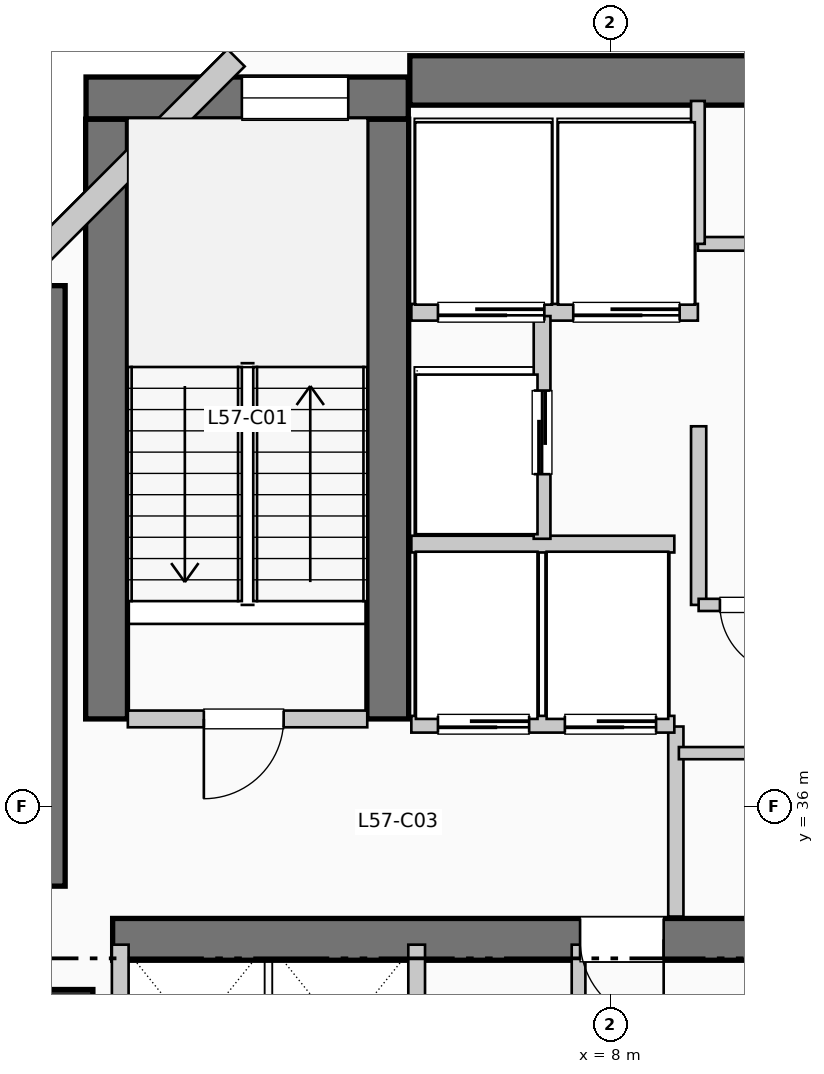
"""IFC4 building model, lengths in metres.
Left out: names, types, materials, properties, quantities, classifications, styles, units other than length and angle.
Written with IfcOpenShell. Run it as: python <this file> out.ifc"""

import sys

from ifc_helpers import new_model, si_unit, direction, frame, frame_2d, origin, origin_2d, place, context, subcontext, project, spatial, rectangle, extrude, element, fill, save


model = new_model("IFC4")
c1 = context("Model", 3, precision=1e-05, world=origin(), true_north=direction((0.0, 1.0)))
c2 = subcontext(c1, "Body", "Model", "MODEL_VIEW")
j1 = project(units=[si_unit("LENGTHUNIT", "METRE"), si_unit("PLANEANGLEUNIT", "RADIAN")], contexts=[c1])
p1 = place(None, origin())
s1 = spatial("IfcSite", under=j1, at=p1, CompositionType="ELEMENT")
p2 = place(p1, origin())
s2 = spatial("IfcBuilding", under=s1, at=p2, CompositionType="ELEMENT")
p3 = place(p2, frame((0.0, 0.0, 235.62)))
s3 = spatial("IfcBuildingStorey", under=s2, at=p3, CompositionType="ELEMENT", Elevation=235.62)
p4 = place(p3, frame((5.36, 45.55, 0.0), z_axis=(0.0, 0.0, 1.0), x_axis=(1.0, 0.0, 0.0)))
e1 = element("IfcWall", 1, at=p4, inside=s3, PredefinedType="SHEAR", context=c2, shape_type="SweptSolid", body=[
    extrude(rectangle(XDim=13.98, YDim=0.65, at=frame_2d((6.99, 0.0))), origin(), (0.0, 0.0, 1.0), 3.96),
])
p5 = place(p3, frame((0.5, 34.95, 0.0), z_axis=(0.0, 0.0, 1.0), x_axis=(0.0, 1.0, 0.0)))
e2 = element("IfcWall", 2, at=p5, inside=s3, PredefinedType="SHEAR", context=c2, shape_type="SweptSolid", body=[
    extrude(rectangle(XDim=7.9, YDim=0.65, at=frame_2d((3.95, 0.0))), origin(), (0.0, 0.0, 1.0), 3.96),
])
p6 = place(p3, frame((1.45, 34.25, 0.0), z_axis=(0.0, 0.0, 1.0), x_axis=(1.0, 0.0, 0.0)))
e3 = element("IfcWall", 3, at=p6, inside=s3, PredefinedType="SHEAR", context=c2, shape_type="SweptSolid", body=[
    extrude(rectangle(XDim=10.71, YDim=0.55, at=frame_2d((5.355, 0.0))), origin(), (0.0, 0.0, 1.0), 3.96),
])
p7 = place(p6, frame((7.25, 0.0, 0.0), z_axis=(0.0, 0.0, 1.0), x_axis=(-1.0, 0.0, 0.0)))
e4 = element("IfcOpeningElement", 4, at=p7, cuts=e3, PredefinedType="OPENING", context=c2, shape_type="SweptSolid", body=[
    extrude(rectangle(XDim=1.1, YDim=2.15, at=frame_2d((0.55, 1.075))), frame((0.0, 0.285, 0.0), z_axis=(0.0, -1.0, 0.0), x_axis=(1.0, 0.0, 0.0)), (0.0, 0.0, 1.0), 0.57),
])
for number, where, z_axis, x_axis in (
    (5, (1.37, 37.15, 0.0), (0.0, 0.0, 1.0), (0.0, 1.0, 0.0)),
    (6, (5.07, 37.15, 0.0), (0.0, 0.0, 1.0), (0.0, 1.0, 0.0)),
):
    element("IfcWall", number, at=place(p3, frame(where, z_axis=z_axis, x_axis=x_axis)), inside=s3, PredefinedType="SHEAR", context=c2, shape_type="SweptSolid", body=[
        extrude(rectangle(XDim=7.89, YDim=0.55, at=frame_2d((3.945, 0.0))), origin(), (0.0, 0.0, 1.0), 3.96),
    ])
p8 = place(p3, frame((1.1, 45.32, 0.0), z_axis=(0.0, 0.0, 1.0), x_axis=(1.0, 0.0, 0.0)))
e7 = element("IfcWall", 7, at=p8, inside=s3, PredefinedType="SHEAR", context=c2, shape_type="SweptSolid", body=[
    extrude(rectangle(XDim=4.24, YDim=0.55, at=frame_2d((2.12, 0.0))), origin(), (0.0, 0.0, 1.0), 3.96),
])
p9 = place(p8, frame((2.05, 0.0, 1.05)))
e8 = element("IfcOpeningElement", 8, at=p9, cuts=e7, PredefinedType="OPENING", context=c2, shape_type="SweptSolid", body=[
    extrude(rectangle(XDim=1.4, YDim=1.8, at=frame_2d((0.7, 0.9))), frame((0.0, 0.285, 0.0), z_axis=(0.0, -1.0, 0.0), x_axis=(1.0, 0.0, 0.0)), (0.0, 0.0, 1.0), 0.57),
])
p10 = place(p3, frame((0.8, 33.2, 0.0), z_axis=(0.0, 0.0, 1.0), x_axis=(1.0, 0.0, 0.0)))
e9 = element("IfcColumn", 9, at=p10, inside=s3, PredefinedType="COLUMN", context=c2, shape_type="SweptSolid", body=[
    extrude(rectangle(XDim=0.78, YDim=0.78, at=origin_2d()), origin(), (0.0, 0.0, 1.0), 3.96),
])
p11 = place(p3, frame((3.074, 45.848, 0.0), z_axis=(0.0, 0.0, 1.0), x_axis=(-0.707106781187, -0.707106781187, 0.0)))
e10 = element("IfcWall", 10, at=p11, inside=s3, PredefinedType="SOLIDWALL", context=c2, shape_type="SweptSolid", body=[
    extrude(rectangle(XDim=4.133, YDim=0.32, at=frame_2d((2.066, 0.0))), origin(), (0.0, 0.0, 1.0), 3.71),
])
p12 = place(p3, frame((1.65, 37.15, 0.0), z_axis=(0.0, 0.0, 1.0), x_axis=(1.0, 0.0, 0.0)))
e11 = element("IfcWall", 11, at=p12, inside=s3, PredefinedType="PARTITIONING", context=c2, shape_type="SweptSolid", body=[
    extrude(rectangle(XDim=3.15, YDim=0.22, at=frame_2d((1.575, 0.0))), origin(), (0.0, 0.0, 1.0), 3.71),
])
p13 = place(p12, frame((2.05, 0.0, 0.0), z_axis=(0.0, 0.0, 1.0), x_axis=(-1.0, 0.0, 0.0)))
e12 = element("IfcOpeningElement", 12, at=p13, cuts=e11, PredefinedType="OPENING", context=c2, shape_type="SweptSolid", body=[
    extrude(rectangle(XDim=1.05, YDim=2.15, at=frame_2d((0.525, 1.075))), frame((0.0, 0.12, 0.0), z_axis=(0.0, -1.0, 0.0), x_axis=(1.0, 0.0, 0.0)), (0.0, 0.0, 1.0), 0.24),
])
p14 = place(p3, frame((8.86, 34.55, 0.0), z_axis=(0.0, 0.0, 1.0), x_axis=(0.0, 1.0, 0.0)))
e13 = element("IfcWall", 13, at=p14, inside=s3, PredefinedType="PARTITIONING", context=c2, shape_type="SweptSolid", body=[
    extrude(rectangle(XDim=2.5, YDim=0.2, at=frame_2d((1.25, 0.0))), origin(), (0.0, 0.0, 1.0), 3.71),
])
p15 = place(p3, frame((5.38, 37.08, 0.0), z_axis=(0.0, 0.0, 1.0), x_axis=(1.0, 0.0, 0.0)))
e14 = element("IfcWall", 14, at=p15, inside=s3, PredefinedType="PARTITIONING", context=c2, shape_type="SweptSolid", body=[
    extrude(rectangle(XDim=3.46, YDim=0.22, at=frame_2d((1.73, 0.0))), origin(), (0.0, 0.0, 1.0), 3.71),
])
p16 = place(p15, frame((1.55, 0.0, 0.0), z_axis=(0.0, 0.0, 1.0), x_axis=(-1.0, 0.0, 0.0)))
e15 = element("IfcOpeningElement", 15, at=p16, cuts=e14, PredefinedType="OPENING", context=c2, shape_type="SweptSolid", body=[
    extrude(rectangle(XDim=1.2, YDim=2.2, at=frame_2d((0.6, 1.1))), frame((0.0, 0.12, 0.0), z_axis=(0.0, -1.0, 0.0), x_axis=(1.0, 0.0, 0.0)), (0.0, 0.0, 1.0), 0.24),
])
p17 = place(p15, frame((3.22, 0.0, 0.0), z_axis=(0.0, 0.0, 1.0), x_axis=(-1.0, 0.0, 0.0)))
e16 = element("IfcOpeningElement", 16, at=p17, cuts=e14, PredefinedType="OPENING", context=c2, shape_type="SweptSolid", body=[
    extrude(rectangle(XDim=1.2, YDim=2.2, at=frame_2d((0.6, 1.1))), frame((0.0, 0.12, 0.0), z_axis=(0.0, -1.0, 0.0), x_axis=(1.0, 0.0, 0.0)), (0.0, 0.0, 1.0), 0.24),
])
p18 = place(p3, frame((5.38, 39.45, 0.0), z_axis=(0.0, 0.0, 1.0), x_axis=(1.0, 0.0, 0.0)))
e17 = element("IfcWall", 17, at=p18, inside=s3, PredefinedType="PARTITIONING", context=c2, shape_type="SweptSolid", body=[
    extrude(rectangle(XDim=3.46, YDim=0.22, at=frame_2d((1.73, 0.0))), origin(), (0.0, 0.0, 1.0), 3.71),
])
p19 = place(p3, frame((5.38, 42.5, 0.0), z_axis=(0.0, 0.0, 1.0), x_axis=(1.0, 0.0, 0.0)))
e18 = element("IfcWall", 18, at=p19, inside=s3, PredefinedType="PARTITIONING", context=c2, shape_type="SweptSolid", body=[
    extrude(rectangle(XDim=3.77, YDim=0.22, at=frame_2d((1.885, 0.0))), origin(), (0.0, 0.0, 1.0), 3.71),
])
p20 = place(p19, frame((1.75, 0.0, 0.0), z_axis=(0.0, 0.0, 1.0), x_axis=(-1.0, 0.0, 0.0)))
e19 = element("IfcOpeningElement", 19, at=p20, cuts=e18, PredefinedType="OPENING", context=c2, shape_type="SweptSolid", body=[
    extrude(rectangle(XDim=1.4, YDim=2.2, at=frame_2d((0.7, 1.1))), frame((0.0, 0.12, 0.0), z_axis=(0.0, -1.0, 0.0), x_axis=(1.0, 0.0, 0.0)), (0.0, 0.0, 1.0), 0.24),
])
p21 = place(p19, frame((3.53, 0.0, 0.0), z_axis=(0.0, 0.0, 1.0), x_axis=(-1.0, 0.0, 0.0)))
e20 = element("IfcOpeningElement", 20, at=p21, cuts=e18, PredefinedType="OPENING", context=c2, shape_type="SweptSolid", body=[
    extrude(rectangle(XDim=1.4, YDim=2.2, at=frame_2d((0.7, 1.1))), frame((0.0, 0.12, 0.0), z_axis=(0.0, -1.0, 0.0), x_axis=(1.0, 0.0, 0.0)), (0.0, 0.0, 1.0), 0.24),
])
p22 = place(p3, frame((7.1, 39.52, 0.0), z_axis=(0.0, 0.0, 1.0), x_axis=(0.0, 1.0, 0.0)))
e21 = element("IfcWall", 21, at=p22, inside=s3, PredefinedType="PARTITIONING", context=c2, shape_type="SweptSolid", body=[
    extrude(rectangle(XDim=2.93, YDim=0.22, at=frame_2d((1.465, 0.0))), origin(), (0.0, 0.0, 1.0), 3.71),
])
p23 = place(p22, frame((0.85, 0.0, 0.0)))
e22 = element("IfcOpeningElement", 22, at=p23, cuts=e21, PredefinedType="OPENING", context=c2, shape_type="SweptSolid", body=[
    extrude(rectangle(XDim=1.1, YDim=2.2, at=frame_2d((0.55, 1.1))), frame((0.0, 0.12, 0.0), z_axis=(0.0, -1.0, 0.0), x_axis=(1.0, 0.0, 0.0)), (0.0, 0.0, 1.0), 0.24),
])
for number, where, z_axis, x_axis in (
    (23, (1.55, 31.8, 0.0), (0.0, 0.0, 1.0), (0.0, 1.0, 0.0)),
    (24, (5.45, 31.8, 0.0), (0.0, 0.0, 1.0), (0.0, 1.0, 0.0)),
):
    element("IfcWall", number, at=place(p3, frame(where, z_axis=z_axis, x_axis=x_axis)), inside=s3, PredefinedType="PARTITIONING", context=c2, shape_type="SweptSolid", body=[
        extrude(rectangle(XDim=2.38, YDim=0.22, at=frame_2d((1.19, 0.0))), origin(), (0.0, 0.0, 1.0), 3.71),
    ])
p24 = place(p3, frame((9.16, 38.65, 0.0), z_axis=(0.0, 0.0, 1.0), x_axis=(0.0, 1.0, 0.0)))
e25 = element("IfcWall", 25, at=p24, inside=s3, PredefinedType="PARTITIONING", context=c2, shape_type="SweptSolid", body=[
    extrude(rectangle(XDim=2.35, YDim=0.2, at=frame_2d((1.175, 0.0))), origin(), (0.0, 0.0, 1.0), 3.71),
])
p25 = place(p3, frame((7.58, 31.82, 0.0), z_axis=(0.0, 0.0, 1.0), x_axis=(0.0, 1.0, 0.0)))
e26 = element("IfcWall", 26, at=p25, inside=s3, PredefinedType="PLUMBINGWALL", context=c2, shape_type="SweptSolid", body=[
    extrude(rectangle(XDim=2.36, YDim=0.18, at=frame_2d((1.18, 0.0))), origin(), (0.0, 0.0, 1.0), 3.71),
])
p26 = place(p3, frame((8.9, 36.7, 0.0), z_axis=(0.0, 0.0, 1.0), x_axis=(1.0, 0.0, 0.0)))
e27 = element("IfcWall", 27, at=p26, inside=s3, PredefinedType="PARTITIONING", context=c2, shape_type="SweptSolid", body=[
    extrude(rectangle(XDim=3.25, YDim=0.16, at=frame_2d((1.625, 0.0))), origin(), (0.0, 0.0, 1.0), 3.71),
])
p27 = place(p26, frame((1.1, 0.0, 0.0)))
e28 = element("IfcOpeningElement", 28, at=p27, cuts=e27, PredefinedType="OPENING", context=c2, shape_type="SweptSolid", body=[
    extrude(rectangle(XDim=0.95, YDim=2.15, at=frame_2d((0.475, 1.075))), frame((0.0, 0.09, 0.0), z_axis=(0.0, -1.0, 0.0), x_axis=(1.0, 0.0, 0.0)), (0.0, 0.0, 1.0), 0.18),
])
p28 = place(p3, frame((9.16, 38.65, 0.0), z_axis=(0.0, 0.0, 1.0), x_axis=(1.0, 0.0, 0.0)))
e29 = element("IfcWall", 29, at=p28, inside=s3, PredefinedType="PARTITIONING", context=c2, shape_type="SweptSolid", body=[
    extrude(rectangle(XDim=3.42, YDim=0.16, at=frame_2d((1.71, 0.0))), origin(), (0.0, 0.0, 1.0), 3.71),
])
p29 = place(p28, frame((1.18, 0.0, 0.0), z_axis=(0.0, 0.0, 1.0), x_axis=(-1.0, 0.0, 0.0)))
e30 = element("IfcOpeningElement", 30, at=p29, cuts=e29, PredefinedType="OPENING", context=c2, shape_type="SweptSolid", body=[
    extrude(rectangle(XDim=0.9, YDim=2.15, at=frame_2d((0.45, 1.075))), frame((0.0, 0.09, 0.0), z_axis=(0.0, -1.0, 0.0), x_axis=(1.0, 0.0, 0.0)), (0.0, 0.0, 1.0), 0.18),
])
p30 = place(p28, frame((2.6, 0.0, 0.0), z_axis=(0.0, 0.0, 1.0), x_axis=(-1.0, 0.0, 0.0)))
e31 = element("IfcOpeningElement", 31, at=p30, cuts=e29, PredefinedType="OPENING", context=c2, shape_type="SweptSolid", body=[
    extrude(rectangle(XDim=0.9, YDim=2.15, at=frame_2d((0.45, 1.075))), frame((0.0, 0.09, 0.0), z_axis=(0.0, -1.0, 0.0), x_axis=(1.0, 0.0, 0.0)), (0.0, 0.0, 1.0), 0.18),
])
p31 = place(p3, frame((9.15, 43.4, 0.0), z_axis=(0.0, 0.0, 1.0), x_axis=(1.0, 0.0, 0.0)))
e32 = element("IfcWall", 32, at=p31, inside=s3, PredefinedType="PLUMBINGWALL", context=c2, shape_type="SweptSolid", body=[
    extrude(rectangle(XDim=9.33, YDim=0.18, at=frame_2d((4.665, 0.0))), origin(), (0.0, 0.0, 1.0), 3.71),
])
p32 = place(p31, frame((0.72, 0.0, 0.0)))
e33 = element("IfcOpeningElement", 33, at=p32, cuts=e32, PredefinedType="OPENING", context=c2, shape_type="SweptSolid", body=[
    extrude(rectangle(XDim=0.92, YDim=2.1, at=frame_2d((0.46, 1.05))), frame((0.0, 0.1, 0.0), z_axis=(0.0, -1.0, 0.0), x_axis=(1.0, 0.0, 0.0)), (0.0, 0.0, 1.0), 0.2),
])
p33 = place(p31, frame((3.02, 0.0, 0.0)))
e34 = element("IfcOpeningElement", 34, at=p33, cuts=e32, PredefinedType="OPENING", context=c2, shape_type="SweptSolid", body=[
    extrude(rectangle(XDim=0.92, YDim=2.1, at=frame_2d((0.46, 1.05))), frame((0.0, 0.1, 0.0), z_axis=(0.0, -1.0, 0.0), x_axis=(1.0, 0.0, 0.0)), (0.0, 0.0, 1.0), 0.2),
])
p34 = place(p31, frame((5.34, 0.0, 0.0)))
e35 = element("IfcOpeningElement", 35, at=p34, cuts=e32, PredefinedType="OPENING", context=c2, shape_type="SweptSolid", body=[
    extrude(rectangle(XDim=0.92, YDim=2.1, at=frame_2d((0.46, 1.05))), frame((0.0, 0.1, 0.0), z_axis=(0.0, -1.0, 0.0), x_axis=(1.0, 0.0, 0.0)), (0.0, 0.0, 1.0), 0.2),
])
p35 = place(p31, frame((7.66, 0.0, 0.0)))
e36 = element("IfcOpeningElement", 36, at=p35, cuts=e32, PredefinedType="OPENING", context=c2, shape_type="SweptSolid", body=[
    extrude(rectangle(XDim=0.95, YDim=2.1, at=frame_2d((0.475, 1.05))), frame((0.0, 0.1, 0.0), z_axis=(0.0, -1.0, 0.0), x_axis=(1.0, 0.0, 0.0)), (0.0, 0.0, 1.0), 0.2),
])
p36 = place(p3, frame((9.15, 43.4, 0.0), z_axis=(0.0, 0.0, 1.0), x_axis=(0.0, 1.0, 0.0)))
e37 = element("IfcWall", 37, at=p36, inside=s3, PredefinedType="PLUMBINGWALL", context=c2, shape_type="SweptSolid", body=[
    extrude(rectangle(XDim=1.88, YDim=0.18, at=frame_2d((0.94, 0.0))), origin(), (0.0, 0.0, 1.0), 3.71),
])
p37 = place(p9, origin())
e38 = element("IfcWindow", 38, at=p37, inside=s3, PartitioningType="SINGLE_PANEL", PredefinedType="WINDOW", context=c2, shape_type="SweptSolid", body=[
    extrude(rectangle(XDim=1.4, YDim=1.8, at=frame_2d((0.7, 0.9))), frame((0.0, 0.03, 0.0), z_axis=(0.0, -1.0, 0.0), x_axis=(1.0, 0.0, 0.0)), (0.0, 0.0, 1.0), 0.06),
])
fill(e8, e38)
p38 = place(p13, origin())
e39 = element("IfcDoor", 39, at=p38, inside=s3, OperationType="SINGLE_SWING_LEFT", PredefinedType="DOOR", context=c2, shape_type="SweptSolid", body=[
    extrude(rectangle(XDim=1.05, YDim=2.15, at=frame_2d((0.525, 1.075))), frame((0.0, 0.025, 0.0), z_axis=(0.0, -1.0, 0.0), x_axis=(1.0, 0.0, 0.0)), (0.0, 0.0, 1.0), 0.05),
])
fill(e12, e39)
p39 = place(p7, origin())
e40 = element("IfcDoor", 40, at=p39, inside=s3, OperationType="SINGLE_SWING_RIGHT", PredefinedType="DOOR", context=c2, shape_type="SweptSolid", body=[
    extrude(rectangle(XDim=1.1, YDim=2.15, at=frame_2d((0.55, 1.075))), frame((0.0, 0.025, 0.0), z_axis=(0.0, -1.0, 0.0), x_axis=(1.0, 0.0, 0.0)), (0.0, 0.0, 1.0), 0.05),
])
fill(e4, e40)
p40 = place(p16, origin())
e41 = element("IfcDoor", 41, at=p40, inside=s3, OperationType="SLIDING_TO_RIGHT", PredefinedType="DOOR", context=c2, shape_type="SweptSolid", body=[
    extrude(rectangle(XDim=1.2, YDim=2.2, at=frame_2d((0.6, 1.1))), frame((0.0, 0.025, 0.0), z_axis=(0.0, -1.0, 0.0), x_axis=(1.0, 0.0, 0.0)), (0.0, 0.0, 1.0), 0.05),
])
fill(e15, e41)
p41 = place(p17, origin())
e42 = element("IfcDoor", 42, at=p41, inside=s3, OperationType="SLIDING_TO_RIGHT", PredefinedType="DOOR", context=c2, shape_type="SweptSolid", body=[
    extrude(rectangle(XDim=1.2, YDim=2.2, at=frame_2d((0.6, 1.1))), frame((0.0, 0.025, 0.0), z_axis=(0.0, -1.0, 0.0), x_axis=(1.0, 0.0, 0.0)), (0.0, 0.0, 1.0), 0.05),
])
fill(e16, e42)
p42 = place(p20, origin())
e43 = element("IfcDoor", 43, at=p42, inside=s3, OperationType="SLIDING_TO_LEFT", PredefinedType="DOOR", context=c2, shape_type="SweptSolid", body=[
    extrude(rectangle(XDim=1.4, YDim=2.2, at=frame_2d((0.7, 1.1))), frame((0.0, 0.025, 0.0), z_axis=(0.0, -1.0, 0.0), x_axis=(1.0, 0.0, 0.0)), (0.0, 0.0, 1.0), 0.05),
])
fill(e19, e43)
p43 = place(p21, origin())
e44 = element("IfcDoor", 44, at=p43, inside=s3, OperationType="SLIDING_TO_LEFT", PredefinedType="DOOR", context=c2, shape_type="SweptSolid", body=[
    extrude(rectangle(XDim=1.4, YDim=2.2, at=frame_2d((0.7, 1.1))), frame((0.0, 0.025, 0.0), z_axis=(0.0, -1.0, 0.0), x_axis=(1.0, 0.0, 0.0)), (0.0, 0.0, 1.0), 0.05),
])
fill(e20, e44)
p44 = place(p23, origin())
e45 = element("IfcDoor", 45, at=p44, inside=s3, OperationType="SLIDING_TO_LEFT", PredefinedType="DOOR", context=c2, shape_type="SweptSolid", body=[
    extrude(rectangle(XDim=1.1, YDim=2.2, at=frame_2d((0.55, 1.1))), frame((0.0, 0.025, 0.0), z_axis=(0.0, -1.0, 0.0), x_axis=(1.0, 0.0, 0.0)), (0.0, 0.0, 1.0), 0.05),
])
fill(e22, e45)
p45 = place(p29, origin())
e46 = element("IfcDoor", 46, at=p45, inside=s3, OperationType="SINGLE_SWING_RIGHT", PredefinedType="DOOR", context=c2, shape_type="SweptSolid", body=[
    extrude(rectangle(XDim=0.9, YDim=2.15, at=frame_2d((0.45, 1.075))), frame((0.0, 0.025, 0.0), z_axis=(0.0, -1.0, 0.0), x_axis=(1.0, 0.0, 0.0)), (0.0, 0.0, 1.0), 0.05),
])
fill(e30, e46)
save(model, sys.argv[1])
